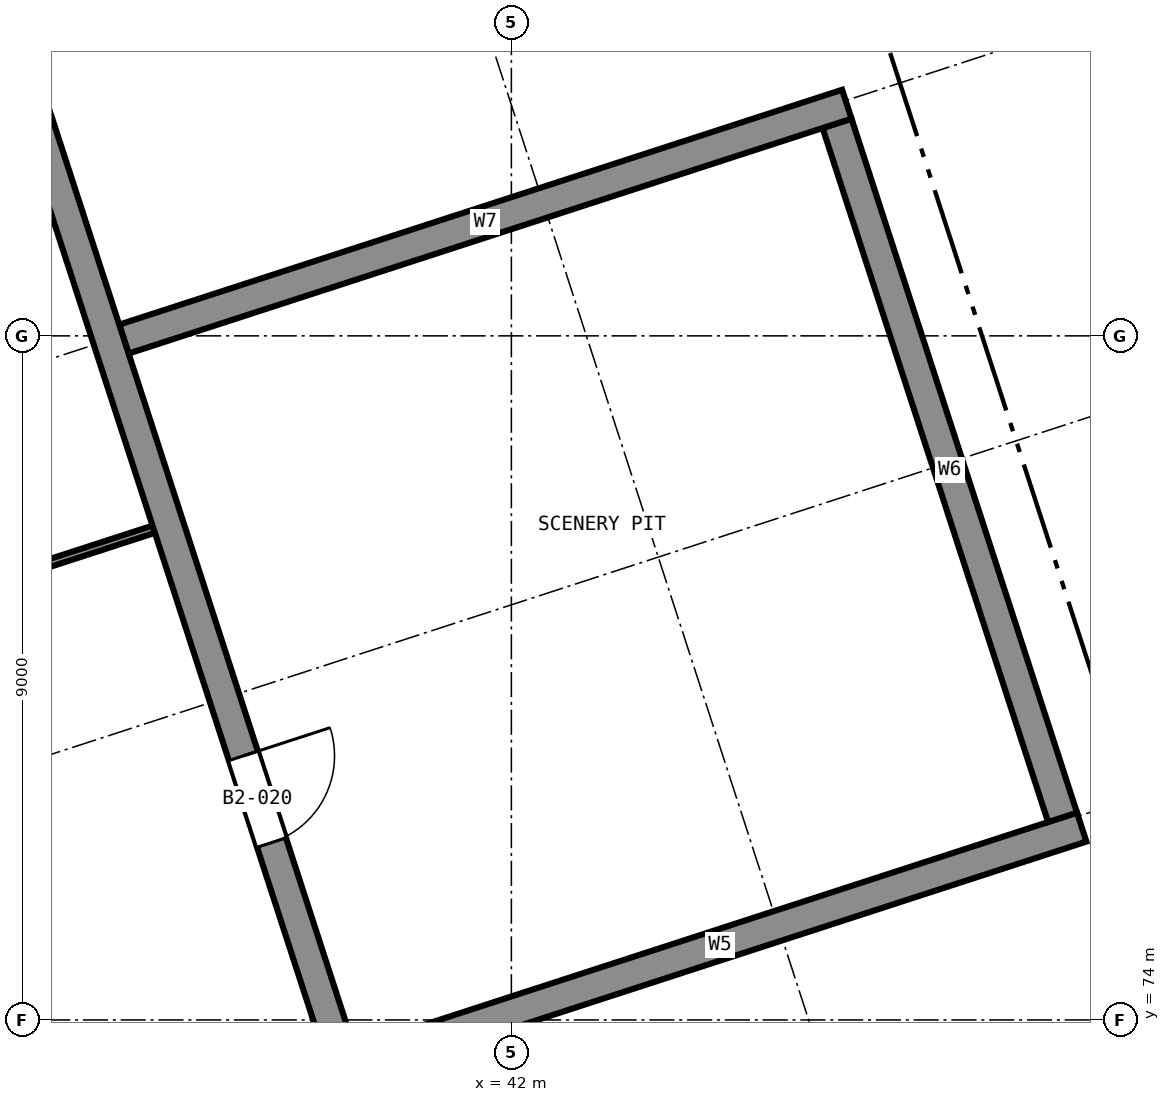
"""IFC4 building model, lengths in metres.
Left out: names, types, materials, properties, quantities, classifications, styles, units other than length and angle.
Written with IfcOpenShell. Run it as: python <this file> out.ifc"""

import sys

from ifc_helpers import new_model, si_unit, direction, frame, frame_2d, origin, place, context, subcontext, project, spatial, rectangle, extrude, element, fill, save


model = new_model("IFC4")
c1 = context("Model", 3, precision=1e-05, world=origin(), true_north=direction((0.0, 1.0)))
c2 = subcontext(c1, "Body", "Model", "MODEL_VIEW")
j1 = project(units=[si_unit("LENGTHUNIT", "METRE"), si_unit("PLANEANGLEUNIT", "RADIAN")], contexts=[c1])
p1 = place(None, origin())
s1 = spatial("IfcSite", under=j1, at=p1, CompositionType="ELEMENT")
p2 = place(p1, origin())
s2 = spatial("IfcBuilding", under=s1, at=p2, CompositionType="ELEMENT")
p3 = place(p2, frame((0.0, 0.0, -10.0)))
s3 = spatial("IfcBuildingStorey", under=s2, at=p3, CompositionType="ELEMENT", Elevation=-10.0)
p4 = place(p3, frame((48.702, 45.994, 0.0), z_axis=(0.0, 0.0, 1.0), x_axis=(-0.309016036191, 0.951056827627, 0.0)))
e1 = element("IfcWall", 1, at=p4, inside=s3, PredefinedType="SOLIDWALL", context=c2, shape_type="SweptSolid", body=[
    extrude(rectangle(XDim=53.6, YDim=0.4, at=frame_2d((26.8, 0.0))), origin(), (0.0, 0.0, 1.0), 5.0),
])
p5 = place(p4, frame((31.9, 0.0, 0.0)))
e2 = element("IfcOpeningElement", 2, at=p5, cuts=e1, PredefinedType="OPENING", context=c2, shape_type="SweptSolid", body=[
    extrude(rectangle(XDim=1.2, YDim=2.1, at=frame_2d((0.6, 1.05))), frame((0.0, 0.21, 0.0), z_axis=(0.0, -1.0, 0.0), x_axis=(1.0, 0.0, 0.0)), (0.0, 0.0, 1.0), 0.42),
])
p6 = place(p3, frame((39.993, 73.447, 0.0), z_axis=(0.0, 0.0, 1.0), x_axis=(0.951058286875, 0.309011545038, 0.0)))
e3 = element("IfcWall", 3, at=p6, inside=s3, PredefinedType="SOLIDWALL", context=c2, shape_type="SweptSolid", body=[
    extrude(rectangle(XDim=10.0, YDim=0.4, at=frame_2d((5.0, 0.0))), origin(), (0.0, 0.0, 1.0), 5.0),
])
p7 = place(p3, frame((49.251, 76.665, 0.0), z_axis=(0.0, 0.0, 1.0), x_axis=(-0.309016491071, 0.951056679828, 0.0)))
e4 = element("IfcWall", 4, at=p7, inside=s3, PredefinedType="SOLIDWALL", context=c2, shape_type="SweptSolid", body=[
    extrude(rectangle(XDim=9.6, YDim=0.4, at=frame_2d((4.8, 0.0))), origin(), (0.0, 0.0, 1.0), 5.0),
])
p8 = place(p3, frame((46.413, 86.047, 0.0), z_axis=(0.0, 0.0, 1.0), x_axis=(-0.951058286875, -0.309011545038, 0.0)))
e5 = element("IfcWall", 5, at=p8, inside=s3, PredefinedType="SOLIDWALL", context=c2, shape_type="SweptSolid", body=[
    extrude(rectangle(XDim=10.0, YDim=0.4, at=frame_2d((5.0, 0.0))), origin(), (0.0, 0.0, 1.0), 5.0),
])
p9 = place(p3, frame((37.956, 48.812, 0.0), z_axis=(0.0, 0.0, 1.0), x_axis=(-0.30901736393, 0.951056396219, 0.0)))
e6 = element("IfcWall", 6, at=p9, inside=s3, PredefinedType="SOLIDWALL", context=c2, shape_type="SweptSolid", body=[
    extrude(rectangle(XDim=41.7, YDim=0.22, at=frame_2d((20.85, 0.0))), origin(), (0.0, 0.0, 1.0), 4.65),
])
p10 = place(p9, frame((2.009, 0.0, 0.0)))
e7 = element("IfcOpeningElement", 7, at=p10, cuts=e6, PredefinedType="OPENING", context=c2, shape_type="SweptSolid", body=[
    extrude(rectangle(XDim=1.0, YDim=2.1, at=frame_2d((0.5, 1.05))), frame((0.0, 0.12, 0.0), z_axis=(0.0, -1.0, 0.0), x_axis=(1.0, 0.0, 0.0)), (0.0, 0.0, 1.0), 0.24),
])
p11 = place(p9, frame((11.495, 0.0, 0.0)))
e8 = element("IfcOpeningElement", 8, at=p11, cuts=e6, PredefinedType="OPENING", context=c2, shape_type="SweptSolid", body=[
    extrude(rectangle(XDim=1.0, YDim=2.1, at=frame_2d((0.5, 1.05))), frame((0.0, 0.12, 0.0), z_axis=(0.0, -1.0, 0.0), x_axis=(1.0, 0.0, 0.0)), (0.0, 0.0, 1.0), 0.24),
])
p12 = place(p9, frame((24.3, 0.0, 0.0)))
e9 = element("IfcOpeningElement", 9, at=p12, cuts=e6, PredefinedType="OPENING", context=c2, shape_type="SweptSolid", body=[
    extrude(rectangle(XDim=1.0, YDim=2.1, at=frame_2d((0.5, 1.05))), frame((0.0, 0.12, 0.0), z_axis=(0.0, -1.0, 0.0), x_axis=(1.0, 0.0, 0.0)), (0.0, 0.0, 1.0), 0.24),
])
p13 = place(p9, frame((35.045, 0.0, 0.0)))
e10 = element("IfcOpeningElement", 10, at=p13, cuts=e6, PredefinedType="OPENING", context=c2, shape_type="SweptSolid", body=[
    extrude(rectangle(XDim=1.0, YDim=2.1, at=frame_2d((0.5, 1.05))), frame((0.0, 0.12, 0.0), z_axis=(0.0, -1.0, 0.0), x_axis=(1.0, 0.0, 0.0)), (0.0, 0.0, 1.0), 0.24),
])
p14 = place(p3, frame((40.333, 49.584, 0.0), z_axis=(0.0, 0.0, 1.0), x_axis=(-0.309015643281, 0.951056955291, 0.0)))
e11 = element("IfcWall", 11, at=p14, inside=s3, PredefinedType="SOLIDWALL", context=c2, shape_type="SweptSolid", body=[
    extrude(rectangle(XDim=41.7, YDim=0.22, at=frame_2d((20.85, 0.0))), origin(), (0.0, 0.0, 1.0), 4.65),
])
p15 = place(p14, frame((5.575, 0.0, 0.0)))
e12 = element("IfcOpeningElement", 12, at=p15, cuts=e11, PredefinedType="OPENING", context=c2, shape_type="SweptSolid", body=[
    extrude(rectangle(XDim=1.0, YDim=2.1, at=frame_2d((0.5, 1.05))), frame((0.0, 0.12, 0.0), z_axis=(0.0, -1.0, 0.0), x_axis=(1.0, 0.0, 0.0)), (0.0, 0.0, 1.0), 0.24),
])
p16 = place(p14, frame((16.475, 0.0, 0.0)))
e13 = element("IfcOpeningElement", 13, at=p16, cuts=e11, PredefinedType="OPENING", context=c2, shape_type="SweptSolid", body=[
    extrude(rectangle(XDim=1.0, YDim=2.1, at=frame_2d((0.5, 1.05))), frame((0.0, 0.12, 0.0), z_axis=(0.0, -1.0, 0.0), x_axis=(1.0, 0.0, 0.0)), (0.0, 0.0, 1.0), 0.24),
])
p17 = place(p14, frame((25.752, 0.0, 0.0)))
e14 = element("IfcOpeningElement", 14, at=p17, cuts=e11, PredefinedType="OPENING", context=c2, shape_type="SweptSolid", body=[
    extrude(rectangle(XDim=1.0, YDim=2.1, at=frame_2d((0.5, 1.05))), frame((0.0, 0.12, 0.0), z_axis=(0.0, -1.0, 0.0), x_axis=(1.0, 0.0, 0.0)), (0.0, 0.0, 1.0), 0.24),
])
p18 = place(p14, frame((35.5, 0.0, 0.0)))
e15 = element("IfcOpeningElement", 15, at=p18, cuts=e11, PredefinedType="OPENING", context=c2, shape_type="SweptSolid", body=[
    extrude(rectangle(XDim=1.0, YDim=2.1, at=frame_2d((0.5, 1.05))), frame((0.0, 0.12, 0.0), z_axis=(0.0, -1.0, 0.0), x_axis=(1.0, 0.0, 0.0)), (0.0, 0.0, 1.0), 0.24),
])
p19 = place(p3, frame((31.075, 78.435, 0.0), z_axis=(0.0, 0.0, 1.0), x_axis=(0.951056287011, 0.309017700038, 0.0)))
e16 = element("IfcWall", 16, at=p19, inside=s3, PredefinedType="PARTITIONING", context=c2, shape_type="SweptSolid", body=[
    extrude(rectangle(XDim=6.54, YDim=0.1, at=frame_2d((3.27, 0.0))), origin(), (0.0, 0.0, 1.0), 4.65),
])
p20 = place(p5, frame((1.2, 0.0, 0.0), z_axis=(0.0, 0.0, 1.0), x_axis=(-1.0, 0.0, 0.0)))
e17 = element("IfcDoor", 17, at=p20, inside=s3, OperationType="SINGLE_SWING_RIGHT", PredefinedType="DOOR", context=c2, shape_type="SweptSolid", body=[
    extrude(rectangle(XDim=1.2, YDim=2.1, at=frame_2d((0.6, 1.05))), frame((0.0, 0.025, 0.0), z_axis=(0.0, -1.0, 0.0), x_axis=(1.0, 0.0, 0.0)), (0.0, 0.0, 1.0), 0.05),
])
fill(e2, e17)
save(model, sys.argv[1])
